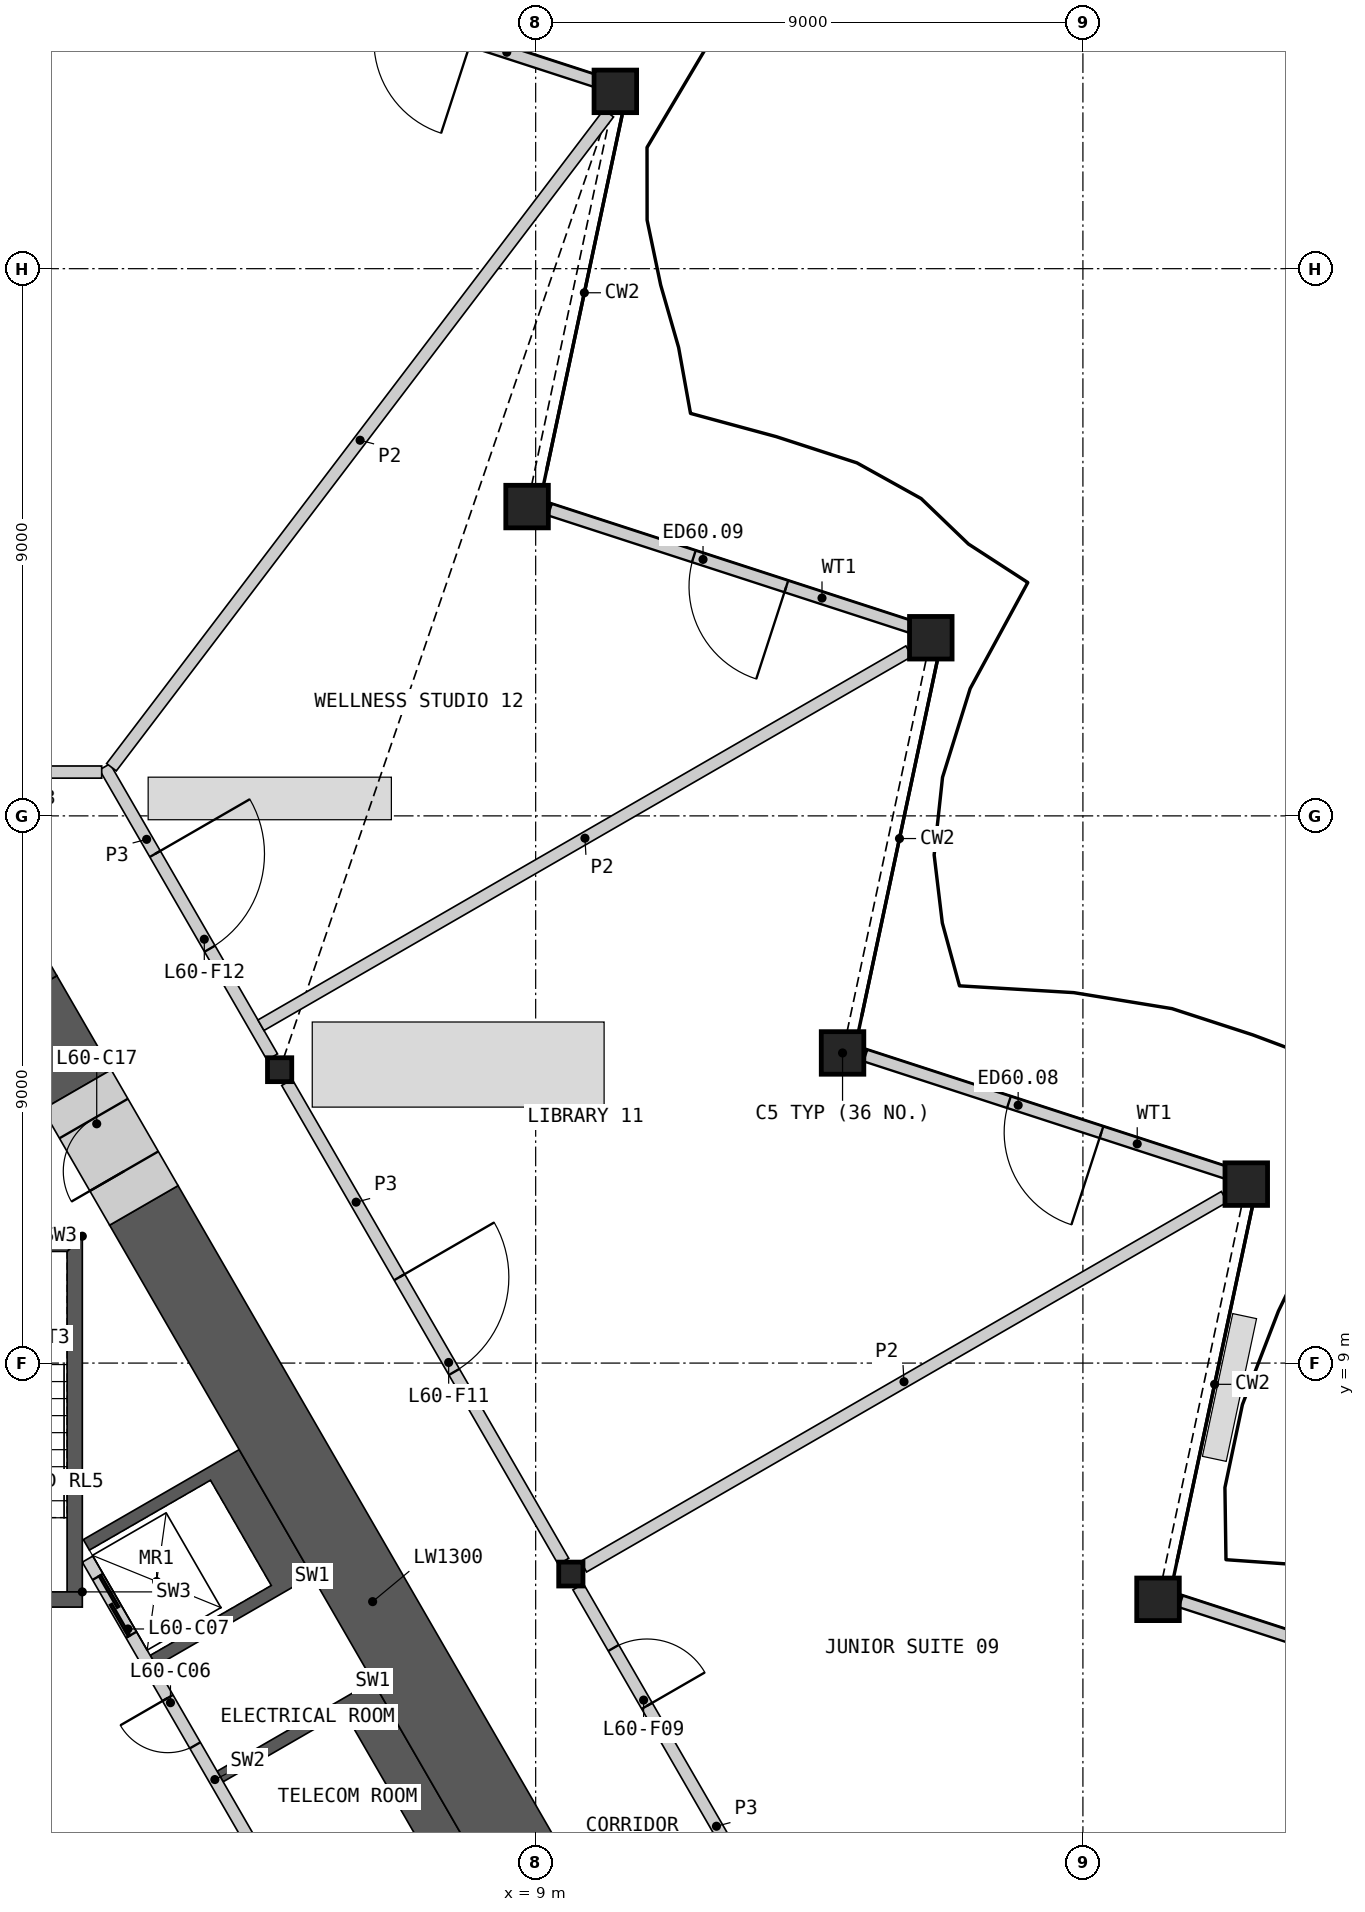
"""IFC4 building model, lengths in metres.
Left out: names, types, materials, properties, quantities, classifications, styles, units other than length and angle.
Written with IfcOpenShell. Run it as: python <this file> out.ifc"""

import sys

from ifc_helpers import new_model, si_unit, direction, frame, frame_2d, origin, origin_2d, place, context, subcontext, project, spatial, polyline, rectangle, hollow_rectangle, i_section, outline, extrude, element, fill, save


model = new_model("IFC4")
c1 = context("Model", 3, precision=1e-05, world=origin(), true_north=direction((0.0, 1.0)))
c2 = subcontext(c1, "Body", "Model", "MODEL_VIEW")
j1 = project(units=[si_unit("LENGTHUNIT", "METRE"), si_unit("PLANEANGLEUNIT", "RADIAN")], contexts=[c1])
p1 = place(None, origin())
s1 = spatial("IfcSite", under=j1, at=p1, CompositionType="ELEMENT")
p2 = place(p1, origin())
s2 = spatial("IfcBuilding", under=s1, at=p2, CompositionType="ELEMENT")
p3 = place(p2, frame((0.0, 0.0, 267.0)))
s3 = spatial("IfcBuildingStorey", under=s2, at=p3, CompositionType="ELEMENT", Elevation=267.0)
for number, where, z_axis, x_axis in (
    (1, (19.235, 5.115, 0.0), (0.0, 0.0, 1.0), (1.0, 0.0, 0.0)),
    (2, (20.687, 11.943, 0.0), (0.0, 0.0, 1.0), (1.0, 0.0, 0.0)),
    (3, (14.047, 14.101, 0.0), (0.0, 0.0, 1.0), (1.0, 0.0, 0.0)),
    (4, (15.499, 20.93, 0.0), (0.0, 0.0, 1.0), (1.0, 0.0, 0.0)),
    (5, (8.859, 23.087, 0.0), (0.0, 0.0, 1.0), (1.0, 0.0, 0.0)),
    (6, (10.31, 29.916, 0.0), (0.0, 0.0, 1.0), (1.0, 0.0, 0.0)),
):
    element("IfcColumn", number, at=place(p3, frame(where, z_axis=z_axis, x_axis=x_axis)), inside=s3, PredefinedType="COLUMN", context=c2, shape_type="SweptSolid", body=[
        extrude(hollow_rectangle(XDim=0.7, YDim=0.7, WallThickness=0.045, at=origin_2d()), origin(), (0.0, 0.0, 1.0), 3.6),
    ])
for number, where, z_axis, x_axis in (
    (7, (9.578, 5.53, 0.0), (0.0, 0.0, 1.0), (1.0, 0.0, 0.0)),
    (8, (4.789, 13.825, 0.0), (0.0, 0.0, 1.0), (1.0, 0.0, 0.0)),
):
    element("IfcColumn", number, at=place(p3, frame(where, z_axis=z_axis, x_axis=x_axis)), inside=s3, PredefinedType="COLUMN", context=c2, shape_type="SweptSolid", body=[
        extrude(i_section(OverallWidth=0.399, OverallDepth=0.393, WebThickness=0.023, FlangeThickness=0.037, at=origin_2d()), origin(), (0.0, 0.0, 1.0), 3.6),
    ])
p4 = place(p3, frame((25.566, 3.145, 0.0), z_axis=(0.0, 0.0, 1.0), x_axis=(-0.951057270474, 0.309014673241, 0.0)))
e9 = element("IfcWall", 9, at=p4, inside=s3, PredefinedType="SOLIDWALL", context=c2, shape_type="SweptSolid", body=[
    extrude(rectangle(XDim=6.263, YDim=0.2, at=frame_2d((3.131, 0.0))), origin(), (0.0, 0.0, 1.0), 2.701),
])
p5 = place(p4, frame((2.186, 0.0, 0.0)))
e10 = element("IfcOpeningElement", 10, at=p5, cuts=e9, PredefinedType="OPENING", context=c2, shape_type="SweptSolid", body=[
    extrude(rectangle(XDim=1.6, YDim=2.4, at=frame_2d((0.8, 1.2))), frame((0.0, 0.11, 0.0), z_axis=(0.0, -1.0, 0.0), x_axis=(1.0, 0.0, 0.0)), (0.0, 0.0, 1.0), 0.22),
])
p6 = place(p3, frame((20.384, 12.121, 0.0), z_axis=(0.0, 0.0, 1.0), x_axis=(-0.951051239427, 0.309033234433, 0.0)))
e11 = element("IfcWall", 11, at=p6, inside=s3, PredefinedType="SOLIDWALL", context=c2, shape_type="SweptSolid", body=[
    extrude(rectangle(XDim=6.269, YDim=0.2, at=frame_2d((3.134, 0.0))), origin(), (0.0, 0.0, 1.0), 2.701),
])
p7 = place(p6, frame((2.186, 0.0, 0.0)))
e12 = element("IfcOpeningElement", 12, at=p7, cuts=e11, PredefinedType="OPENING", context=c2, shape_type="SweptSolid", body=[
    extrude(rectangle(XDim=1.6, YDim=2.4, at=frame_2d((0.8, 1.2))), frame((0.0, 0.11, 0.0), z_axis=(0.0, -1.0, 0.0), x_axis=(1.0, 0.0, 0.0)), (0.0, 0.0, 1.0), 0.22),
])
p8 = place(p3, frame((15.201, 21.098, 0.0), z_axis=(0.0, 0.0, 1.0), x_axis=(-0.95105665506, 0.309016567299, 0.0)))
e13 = element("IfcWall", 13, at=p8, inside=s3, PredefinedType="SOLIDWALL", context=c2, shape_type="SweptSolid", body=[
    extrude(rectangle(XDim=6.275, YDim=0.2, at=frame_2d((3.137, 0.0))), origin(), (0.0, 0.0, 1.0), 2.701),
])
p9 = place(p8, frame((2.186, 0.0, 0.0)))
e14 = element("IfcOpeningElement", 14, at=p9, cuts=e13, PredefinedType="OPENING", context=c2, shape_type="SweptSolid", body=[
    extrude(rectangle(XDim=1.6, YDim=2.4, at=frame_2d((0.8, 1.2))), frame((0.0, 0.11, 0.0), z_axis=(0.0, -1.0, 0.0), x_axis=(1.0, 0.0, 0.0)), (0.0, 0.0, 1.0), 0.22),
])
p10 = place(p3, frame((10.018, 30.074, 0.0), z_axis=(0.0, 0.0, 1.0), x_axis=(-0.951062060282, 0.308999931218, 0.0)))
e15 = element("IfcWall", 15, at=p10, inside=s3, PredefinedType="SOLIDWALL", context=c2, shape_type="SweptSolid", body=[
    extrude(rectangle(XDim=6.281, YDim=0.2, at=frame_2d((3.14, 0.0))), origin(), (0.0, 0.0, 1.0), 2.701),
])
p11 = place(p10, frame((2.186, 0.0, 0.0)))
e16 = element("IfcOpeningElement", 16, at=p11, cuts=e15, PredefinedType="OPENING", context=c2, shape_type="SweptSolid", body=[
    extrude(rectangle(XDim=1.6, YDim=2.4, at=frame_2d((0.8, 1.2))), frame((0.0, 0.11, 0.0), z_axis=(0.0, -1.0, 0.0), x_axis=(1.0, 0.0, 0.0)), (0.0, 0.0, 1.0), 0.22),
])
p12 = place(p3, origin())
e17 = element("IfcWall", 17, at=p12, inside=s3, PredefinedType="SHEAR", context=c2, shape_type="SweptSolid", body=[
    extrude(outline(polyline([(6.324, 3.767), (8.624, -0.217), (8.231, -0.444), (6.061, -1.697), (5.96, -1.524), (7.952, -0.374), (5.852, 3.263), (3.861, 2.113), (3.76, 2.287), (5.931, 3.54), (6.324, 3.767)])), origin(), (0.0, 0.0, 1.0), 3.25),
])
p13 = place(p3, origin())
e18 = element("IfcWall", 18, at=p13, inside=s3, PredefinedType="SHEAR", context=c2, shape_type="SweptSolid", body=[
    extrude(outline(polyline([(5.324, 5.499), (4.931, 5.272), (2.76, 4.019), (2.66, 4.192), (4.652, 5.342), (3.652, 7.074), (1.66, 5.924), (1.561, 6.097), (3.731, 7.35), (4.124, 7.577), (5.324, 5.499)])), origin(), (0.0, 0.0, 1.0), 3.25),
])
p14 = place(p3, frame((5.817, -1.476, 0.0), z_axis=(0.0, 0.0, 1.0), x_axis=(-0.500002616675, 0.866023893041, 0.0)))
e19 = element("IfcWall", 19, at=p14, inside=s3, PredefinedType="SOLIDWALL", context=c2, shape_type="SweptSolid", body=[
    extrude(rectangle(XDim=8.373, YDim=0.2, at=frame_2d((4.187, 0.0))), origin(), (0.0, 0.0, 1.0), 3.25),
])
p15 = place(p14, frame((1.537, 0.0, 0.0)))
e20 = element("IfcOpeningElement", 20, at=p15, cuts=e19, PredefinedType="OPENING", context=c2, shape_type="SweptSolid", body=[
    extrude(rectangle(XDim=0.9, YDim=2.1, at=frame_2d((0.45, 1.05))), frame((0.0, 0.11, 0.0), z_axis=(0.0, -1.0, 0.0), x_axis=(1.0, 0.0, 0.0)), (0.0, 0.0, 1.0), 0.22),
])
p16 = place(p14, frame((4.837, 0.0, 0.0)))
e21 = element("IfcOpeningElement", 21, at=p16, cuts=e19, PredefinedType="OPENING", context=c2, shape_type="SweptSolid", body=[
    extrude(rectangle(XDim=0.9, YDim=2.1, at=frame_2d((0.45, 1.05))), frame((0.0, 0.11, 0.0), z_axis=(0.0, -1.0, 0.0), x_axis=(1.0, 0.0, 0.0)), (0.0, 0.0, 1.0), 0.22),
])
p17 = place(p14, frame((6.937, 0.0, 0.0)))
e22 = element("IfcOpeningElement", 22, at=p17, cuts=e19, PredefinedType="OPENING", context=c2, shape_type="SweptSolid", body=[
    extrude(rectangle(XDim=1.1, YDim=2.1, at=frame_2d((0.55, 1.05))), frame((0.0, 0.11, 0.0), z_axis=(0.0, -1.0, 0.0), x_axis=(1.0, 0.0, 0.0)), (0.0, 0.0, 1.0), 0.22),
])
p18 = place(p3, origin())
e23 = element("IfcWall", 23, at=p18, inside=s3, PredefinedType="SHEAR", context=c2, shape_type="SweptSolid", body=[
    extrude(outline(polyline([(1.544, 5.237), (1.544, 11.087), (1.294, 10.837), (1.294, 5.237), (1.544, 5.237)])), origin(), (0.0, 0.0, 1.0), 3.25),
])
p19 = place(p3, origin())
e24 = element("IfcWall", 24, at=p19, inside=s3, PredefinedType="SHEAR", context=c2, shape_type="SweptSolid", body=[
    extrude(outline(polyline([(1.544, 11.087), (-1.544, 11.087), (-1.294, 10.837), (1.294, 10.837), (1.544, 11.087)])), origin(), (0.0, 0.0, 1.0), 3.25),
])
p20 = place(p3, frame((1.544, 5.112, 0.0), z_axis=(0.0, 0.0, 1.0), x_axis=(-1.0, 0.0, 0.0)))
e25 = element("IfcWall", 25, at=p20, inside=s3, PredefinedType="SHEAR", context=c2, shape_type="SweptSolid", body=[
    extrude(rectangle(XDim=3.088, YDim=0.25, at=frame_2d((1.544, 0.0))), origin(), (0.0, 0.0, 1.0), 3.25),
])
p21 = place(p20, frame((0.994, 0.0, 0.0)))
e26 = element("IfcOpeningElement", 26, at=p21, cuts=e25, PredefinedType="OPENING", context=c2, shape_type="SweptSolid", body=[
    extrude(rectangle(XDim=1.1, YDim=2.1, at=frame_2d((0.55, 1.05))), frame((0.0, 0.135, 0.0), z_axis=(0.0, -1.0, 0.0), x_axis=(1.0, 0.0, 0.0)), (0.0, 0.0, 1.0), 0.27),
])
p22 = place(p3, frame((10.081, -1.441, 0.0), z_axis=(0.0, 0.0, 1.0), x_axis=(-0.500012180433, 0.866018371294, 0.0)))
e27 = element("IfcWall", 27, at=p22, inside=s3, PredefinedType="SHEAR", context=c2, shape_type="SweptSolid", body=[
    extrude(rectangle(XDim=15.05, YDim=1.3, at=frame_2d((7.525, 0.0))), origin(), (0.0, 0.0, 1.0), 3.25),
])
p23 = place(p3, frame((1.456, 13.499, 0.0), z_axis=(0.0, 0.0, 1.0), x_axis=(-0.499990639951, 0.866030807744, 0.0)))
e28 = element("IfcWall", 28, at=p23, inside=s3, PredefinedType="SHEAR", context=c2, shape_type="SweptSolid", body=[
    extrude(rectangle(XDim=1.786, YDim=1.3, at=frame_2d((0.893, 0.0))), origin(), (0.0, 0.0, 1.0), 3.25),
])
p24 = place(p3, origin())
e29 = element("IfcWall", 29, at=p24, inside=s3, PredefinedType="SHEAR", context=c2, shape_type="SweptSolid", body=[
    extrude(outline(polyline([(-1.126, 15.371), (0.0, 17.321), (1.126, 15.371), (0.0, 14.72), (-1.126, 15.371)])), origin(), (0.0, 0.0, 1.0), 3.25),
])
p25 = place(p3, frame((2.556, 11.593, 0.0), z_axis=(0.0, 0.0, 1.0), x_axis=(-0.499946605688, 0.86605622881, 0.0)))
e30 = element("IfcWall", 30, at=p25, inside=s3, PredefinedType="SHEAR", context=c2, shape_type="SweptSolid", body=[
    extrude(rectangle(XDim=2.2, YDim=1.3, at=frame_2d((1.1, 0.0))), origin(), (0.0, 0.0, 1.0), 3.25),
])
p26 = place(p25, frame((0.65, 0.0, 0.0)))
e31 = element("IfcOpeningElement", 31, at=p26, cuts=e30, PredefinedType="OPENING", context=c2, shape_type="SweptSolid", body=[
    extrude(rectangle(XDim=1.0, YDim=2.1, at=frame_2d((0.5, 1.05))), frame((0.0, 0.66, 0.0), z_axis=(0.0, -1.0, 0.0), x_axis=(1.0, 0.0, 0.0)), (0.0, 0.0, 1.0), 1.32),
])
p27 = place(p3, frame((9.699, 5.321, 0.0), z_axis=(0.0, 0.0, 1.0), x_axis=(0.49998193945, -0.866035830797, 0.0)))
e32 = element("IfcWall", 32, at=p27, inside=s3, PredefinedType="PARTITIONING", context=c2, shape_type="SweptSolid", body=[
    extrude(rectangle(XDim=9.094, YDim=0.2, at=frame_2d((4.547, 0.0))), origin(), (0.0, 0.0, 1.0), 3.25),
])
p28 = place(p27, frame((1.162, 0.0, 0.0)))
e33 = element("IfcOpeningElement", 33, at=p28, cuts=e32, PredefinedType="OPENING", context=c2, shape_type="SweptSolid", body=[
    extrude(rectangle(XDim=1.1, YDim=2.1, at=frame_2d((0.55, 1.05))), frame((0.0, 0.11, 0.0), z_axis=(0.0, -1.0, 0.0), x_axis=(1.0, 0.0, 0.0)), (0.0, 0.0, 1.0), 0.22),
])
p29 = place(p3, frame((4.91, 13.616, 0.0), z_axis=(0.0, 0.0, 1.0), x_axis=(0.50000207303, -0.866024206917, 0.0)))
e34 = element("IfcWall", 34, at=p29, inside=s3, PredefinedType="PARTITIONING", context=c2, shape_type="SweptSolid", body=[
    extrude(rectangle(XDim=9.095, YDim=0.2, at=frame_2d((4.547, 0.0))), origin(), (0.0, 0.0, 1.0), 3.25),
])
p30 = place(p29, frame((3.698, 0.0, 0.0)))
e35 = element("IfcOpeningElement", 35, at=p30, cuts=e34, PredefinedType="OPENING", context=c2, shape_type="SweptSolid", body=[
    extrude(rectangle(XDim=1.8, YDim=2.1, at=frame_2d((0.9, 1.05))), frame((0.0, 0.11, 0.0), z_axis=(0.0, -1.0, 0.0), x_axis=(1.0, 0.0, 0.0)), (0.0, 0.0, 1.0), 0.22),
])
p31 = place(p3, frame((1.913, 18.807, 0.0), z_axis=(0.0, 0.0, 1.0), x_axis=(0.499984524817, -0.866034338201, 0.0)))
e36 = element("IfcWall", 36, at=p31, inside=s3, PredefinedType="PARTITIONING", context=c2, shape_type="SweptSolid", body=[
    extrude(rectangle(XDim=5.51, YDim=0.2, at=frame_2d((2.755, 0.0))), origin(), (0.0, 0.0, 1.0), 3.25),
])
p32 = place(p31, frame((1.655, 0.0, 0.0)))
e37 = element("IfcOpeningElement", 37, at=p32, cuts=e36, PredefinedType="OPENING", context=c2, shape_type="SweptSolid", body=[
    extrude(rectangle(XDim=1.8, YDim=2.1, at=frame_2d((0.9, 1.05))), frame((0.0, 0.11, 0.0), z_axis=(0.0, -1.0, 0.0), x_axis=(1.0, 0.0, 0.0)), (0.0, 0.0, 1.0), 0.22),
])
p33 = place(p3, frame((-1.963, 18.72, 0.0), z_axis=(0.0, 0.0, 1.0), x_axis=(1.0, 0.0, 0.0)))
e38 = element("IfcWall", 38, at=p33, inside=s3, PredefinedType="PARTITIONING", context=c2, shape_type="SweptSolid", body=[
    extrude(rectangle(XDim=3.826, YDim=0.2, at=frame_2d((1.913, 0.0))), origin(), (0.0, 0.0, 1.0), 3.25),
])
p34 = place(p33, frame((1.064, 0.0, 0.0)))
e39 = element("IfcOpeningElement", 39, at=p34, cuts=e38, PredefinedType="OPENING", context=c2, shape_type="SweptSolid", body=[
    extrude(rectangle(XDim=1.8, YDim=2.1, at=frame_2d((0.9, 1.05))), frame((0.0, 0.11, 0.0), z_axis=(0.0, -1.0, 0.0), x_axis=(1.0, 0.0, 0.0)), (0.0, 0.0, 1.0), 0.22),
])
p35 = place(p3, frame((2.024, 18.8, 0.0), z_axis=(0.0, 0.0, 1.0), x_axis=(0.605225740135, 0.796053894832, 0.0)))
e40 = element("IfcWall", 40, at=p35, inside=s3, PredefinedType="PARTITIONING", context=c2, shape_type="SweptSolid", body=[
    extrude(rectangle(XDim=13.511, YDim=0.2, at=frame_2d((6.756, 0.0))), origin(), (0.0, 0.0, 1.0), 2.404),
])
p36 = place(p3, frame((14.848, -3.396, 0.0), z_axis=(0.0, 0.0, 1.0), x_axis=(0.866026822589, 0.49999754255, 0.0)))
e41 = element("IfcWall", 41, at=p36, inside=s3, PredefinedType="PARTITIONING", context=c2, shape_type="SweptSolid", body=[
    extrude(rectangle(XDim=12.317, YDim=0.2, at=frame_2d((6.159, 0.0))), origin(), (0.0, 0.0, 1.0), 2.404),
])
p37 = place(p3, frame((4.482, 14.557, 0.0), z_axis=(0.0, 0.0, 1.0), x_axis=(0.866030620616, 0.499990964073, 0.0)))
e42 = element("IfcWall", 42, at=p37, inside=s3, PredefinedType="PARTITIONING", context=c2, shape_type="SweptSolid", body=[
    extrude(rectangle(XDim=12.304, YDim=0.2, at=frame_2d((6.152, 0.0))), origin(), (0.0, 0.0, 1.0), 2.404),
])
p38 = place(p3, frame((9.788, 5.651, 0.0), z_axis=(0.0, 0.0, 1.0), x_axis=(0.866024549986, 0.50000147882, 0.0)))
e43 = element("IfcWall", 43, at=p38, inside=s3, PredefinedType="PARTITIONING", context=c2, shape_type="SweptSolid", body=[
    extrude(rectangle(XDim=12.169, YDim=0.2, at=frame_2d((6.084, 0.0))), origin(), (0.0, 0.0, 1.0), 2.404),
])
p39 = place(p7, origin())
e44 = element("IfcDoor", 44, at=p39, inside=s3, OperationType="DOUBLE_DOOR_SINGLE_SWING", PredefinedType="DOOR", context=c2, shape_type="SweptSolid", body=[
    extrude(rectangle(XDim=1.6, YDim=2.4, at=frame_2d((0.8, 1.2))), frame((0.0, 0.025, 0.0), z_axis=(0.0, -1.0, 0.0), x_axis=(1.0, 0.0, 0.0)), (0.0, 0.0, 1.0), 0.05),
])
fill(e12, e44)
p40 = place(p9, origin())
e45 = element("IfcDoor", 45, at=p40, inside=s3, OperationType="DOUBLE_DOOR_SINGLE_SWING", PredefinedType="DOOR", context=c2, shape_type="SweptSolid", body=[
    extrude(rectangle(XDim=1.6, YDim=2.4, at=frame_2d((0.8, 1.2))), frame((0.0, 0.025, 0.0), z_axis=(0.0, -1.0, 0.0), x_axis=(1.0, 0.0, 0.0)), (0.0, 0.0, 1.0), 0.05),
])
fill(e14, e45)
p41 = place(p16, origin())
e46 = element("IfcDoor", 46, at=p41, inside=s3, OperationType="SINGLE_SWING_RIGHT", PredefinedType="DOOR", context=c2, shape_type="SweptSolid", body=[
    extrude(rectangle(XDim=0.9, YDim=2.1, at=frame_2d((0.45, 1.05))), frame((0.0, 0.025, 0.0), z_axis=(0.0, -1.0, 0.0), x_axis=(1.0, 0.0, 0.0)), (0.0, 0.0, 1.0), 0.05),
])
fill(e21, e46)
p42 = place(p17, origin())
e47 = element("IfcDoor", 47, at=p42, inside=s3, OperationType="SLIDING_TO_LEFT", PredefinedType="DOOR", context=c2, shape_type="SweptSolid", body=[
    extrude(rectangle(XDim=1.1, YDim=2.1, at=frame_2d((0.55, 1.05))), frame((0.0, 0.025, 0.0), z_axis=(0.0, -1.0, 0.0), x_axis=(1.0, 0.0, 0.0)), (0.0, 0.0, 1.0), 0.05),
])
fill(e22, e47)
p43 = place(p26, origin())
e48 = element("IfcDoor", 48, at=p43, inside=s3, OperationType="SINGLE_SWING_LEFT", PredefinedType="DOOR", context=c2, shape_type="SweptSolid", body=[
    extrude(rectangle(XDim=1.0, YDim=2.1, at=frame_2d((0.5, 1.05))), frame((0.0, 0.405, 0.0), z_axis=(0.0, -1.0, 0.0), x_axis=(1.0, 0.0, 0.0)), (0.0, 0.0, 1.0), 0.05),
])
fill(e31, e48)
p44 = place(p28, origin())
e49 = element("IfcDoor", 49, at=p44, inside=s3, OperationType="SINGLE_SWING_RIGHT", PredefinedType="DOOR", context=c2, shape_type="SweptSolid", body=[
    extrude(rectangle(XDim=1.1, YDim=2.1, at=frame_2d((0.55, 1.05))), frame((0.0, 0.025, 0.0), z_axis=(0.0, -1.0, 0.0), x_axis=(1.0, 0.0, 0.0)), (0.0, 0.0, 1.0), 0.05),
])
fill(e33, e49)
p45 = place(p30, origin())
e50 = element("IfcDoor", 50, at=p45, inside=s3, OperationType="DOUBLE_DOOR_SINGLE_SWING", PredefinedType="DOOR", context=c2, shape_type="SweptSolid", body=[
    extrude(rectangle(XDim=1.8, YDim=2.1, at=frame_2d((0.9, 1.05))), frame((0.0, 0.025, 0.0), z_axis=(0.0, -1.0, 0.0), x_axis=(1.0, 0.0, 0.0)), (0.0, 0.0, 1.0), 0.05),
])
fill(e35, e50)
p46 = place(p32, origin())
e51 = element("IfcDoor", 51, at=p46, inside=s3, OperationType="DOUBLE_DOOR_SINGLE_SWING", PredefinedType="DOOR", context=c2, shape_type="SweptSolid", body=[
    extrude(rectangle(XDim=1.8, YDim=2.1, at=frame_2d((0.9, 1.05))), frame((0.0, 0.025, 0.0), z_axis=(0.0, -1.0, 0.0), x_axis=(1.0, 0.0, 0.0)), (0.0, 0.0, 1.0), 0.05),
])
fill(e37, e51)
save(model, sys.argv[1])
